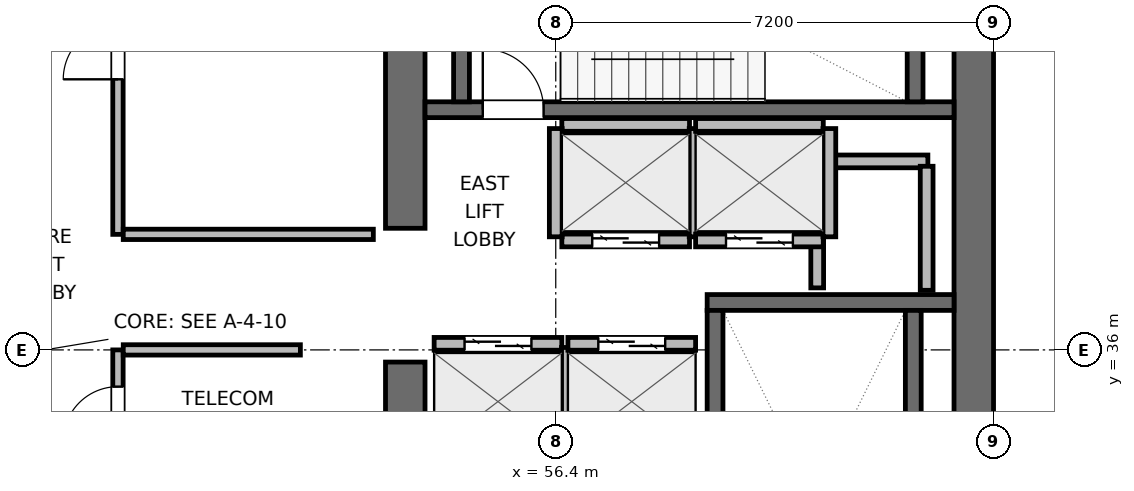
"""IFC4 building model, lengths in metres.
Left out: names, types, materials, properties, quantities, classifications, styles, units other than length and angle.
Written with IfcOpenShell. Run it as: python <this file> out.ifc"""

import sys

from ifc_helpers import new_model, si_unit, direction, frame, frame_2d, origin, place, context, subcontext, project, spatial, rectangle, extrude, element, fill, save


model = new_model("IFC4")
c1 = context("Model", 3, precision=1e-05, world=origin(), true_north=direction((0.0, 1.0)))
c2 = subcontext(c1, "Body", "Model", "MODEL_VIEW")
j1 = project(units=[si_unit("LENGTHUNIT", "METRE"), si_unit("PLANEANGLEUNIT", "RADIAN")], contexts=[c1])
p1 = place(None, origin())
s1 = spatial("IfcSite", under=j1, at=p1, CompositionType="ELEMENT")
p2 = place(p1, origin())
s2 = spatial("IfcBuilding", under=s1, at=p2, CompositionType="ELEMENT")
p3 = place(p2, frame((0.0, 0.0, 214.8)))
s3 = spatial("IfcBuildingStorey", under=s2, at=p3, CompositionType="ELEMENT", Elevation=214.8)
p4 = place(p3, frame((53.925, 27.925, 0.0), z_axis=(0.0, 0.0, 1.0), x_axis=(0.0, 1.0, 0.0)))
e1 = element("IfcWall", 1, at=p4, inside=s3, PredefinedType="SHEAR", context=c2, shape_type="SweptSolid", body=[
    extrude(rectangle(XDim=7.875, YDim=0.65, at=frame_2d((3.938, 0.0))), origin(), (0.0, 0.0, 1.0), 4.5),
])
p5 = place(p3, frame((53.925, 38.0, 0.0), z_axis=(0.0, 0.0, 1.0), x_axis=(0.0, 1.0, 0.0)))
e2 = element("IfcWall", 2, at=p5, inside=s3, PredefinedType="SHEAR", context=c2, shape_type="SweptSolid", body=[
    extrude(rectangle(XDim=6.075, YDim=0.65, at=frame_2d((3.038, 0.0))), origin(), (0.0, 0.0, 1.0), 4.5),
])
p6 = place(p3, frame((63.275, 27.6, 0.0), z_axis=(0.0, 0.0, 1.0), x_axis=(0.0, 1.0, 0.0)))
e3 = element("IfcWall", 3, at=p6, inside=s3, PredefinedType="SHEAR", context=c2, shape_type="SweptSolid", body=[
    extrude(rectangle(XDim=16.8, YDim=0.65, at=frame_2d((8.4, 0.0))), origin(), (0.0, 0.0, 1.0), 4.5),
])
p7 = place(p3, frame((58.89, 36.78, 0.0), z_axis=(0.0, 0.0, 1.0), x_axis=(1.0, 0.0, 0.0)))
e4 = element("IfcWall", 4, at=p7, inside=s3, PredefinedType="SHEAR", context=c2, shape_type="SweptSolid", body=[
    extrude(rectangle(XDim=4.06, YDim=0.26, at=frame_2d((2.03, 0.0))), origin(), (0.0, 0.0, 1.0), 4.5),
])
p8 = place(p3, frame((59.02, 29.05, 0.0), z_axis=(0.0, 0.0, 1.0), x_axis=(0.0, 1.0, 0.0)))
e5 = element("IfcWall", 5, at=p8, inside=s3, PredefinedType="SHEAR", context=c2, shape_type="SweptSolid", body=[
    extrude(rectangle(XDim=7.6, YDim=0.26, at=frame_2d((3.8, 0.0))), origin(), (0.0, 0.0, 1.0), 4.5),
])
p9 = place(p8, frame((0.3, 0.0, 0.0)))
e6 = element("IfcOpeningElement", 6, at=p9, cuts=e5, PredefinedType="OPENING", context=c2, shape_type="SweptSolid", body=[
    extrude(rectangle(XDim=1.0, YDim=2.04, at=frame_2d((0.5, 1.02))), frame((0.0, 0.14, 0.0), z_axis=(0.0, -1.0, 0.0), x_axis=(1.0, 0.0, 0.0)), (0.0, 0.0, 1.0), 0.28),
])
p10 = place(p3, frame((62.28, 29.05, 0.0), z_axis=(0.0, 0.0, 1.0), x_axis=(0.0, 1.0, 0.0)))
e7 = element("IfcWall", 7, at=p10, inside=s3, PredefinedType="SHEAR", context=c2, shape_type="SweptSolid", body=[
    extrude(rectangle(XDim=7.6, YDim=0.26, at=frame_2d((3.8, 0.0))), origin(), (0.0, 0.0, 1.0), 4.5),
])
p11 = place(p3, frame((54.25, 39.95, 0.0), z_axis=(0.0, 0.0, 1.0), x_axis=(1.0, 0.0, 0.0)))
e8 = element("IfcWall", 8, at=p11, inside=s3, PredefinedType="SHEAR", context=c2, shape_type="SweptSolid", body=[
    extrude(rectangle(XDim=8.7, YDim=0.26, at=frame_2d((4.35, 0.0))), origin(), (0.0, 0.0, 1.0), 4.5),
])
p12 = place(p11, frame((0.95, 0.0, 0.0)))
e9 = element("IfcOpeningElement", 9, at=p12, cuts=e8, PredefinedType="OPENING", context=c2, shape_type="SweptSolid", body=[
    extrude(rectangle(XDim=1.0, YDim=2.04, at=frame_2d((0.5, 1.02))), frame((0.0, 0.14, 0.0), z_axis=(0.0, -1.0, 0.0), x_axis=(1.0, 0.0, 0.0)), (0.0, 0.0, 1.0), 0.28),
])
for number, where, z_axis, x_axis in (
    (10, (54.85, 40.08, 0.0), (0.0, 0.0, 1.0), (0.0, 1.0, 0.0)),
    (11, (62.31, 40.08, 0.0), (0.0, 0.0, 1.0), (0.0, 1.0, 0.0)),
):
    element("IfcWall", number, at=place(p3, frame(where, z_axis=z_axis, x_axis=x_axis)), inside=s3, PredefinedType="SHEAR", context=c2, shape_type="SweptSolid", body=[
        extrude(rectangle(XDim=2.94, YDim=0.26, at=frame_2d((1.47, 0.0))), origin(), (0.0, 0.0, 1.0), 4.5),
    ])
p13 = place(p3, frame((60.72, 39.1, 0.0), z_axis=(0.0, 0.0, 1.0), x_axis=(1.0, 0.0, 0.0)))
e12 = element("IfcWall", 12, at=p13, inside=s3, PredefinedType="PARTITIONING", context=c2, shape_type="SweptSolid", body=[
    extrude(rectangle(XDim=1.8, YDim=0.21, at=frame_2d((0.9, 0.0))), origin(), (0.0, 0.0, 1.0), 4.28),
])
p14 = place(p3, frame((60.7, 37.02, 0.0), z_axis=(0.0, 0.0, 1.0), x_axis=(0.0, 1.0, 0.0)))
e13 = element("IfcWall", 13, at=p14, inside=s3, PredefinedType="PARTITIONING", context=c2, shape_type="SweptSolid", body=[
    extrude(rectangle(XDim=1.96, YDim=0.21, at=frame_2d((0.98, 0.0))), origin(), (0.0, 0.0, 1.0), 4.28),
])
p15 = place(p3, frame((62.5, 36.98, 0.0), z_axis=(0.0, 0.0, 1.0), x_axis=(0.0, 1.0, 0.0)))
e14 = element("IfcWall", 14, at=p15, inside=s3, PredefinedType="PARTITIONING", context=c2, shape_type="SweptSolid", body=[
    extrude(rectangle(XDim=2.04, YDim=0.21, at=frame_2d((1.02, 0.0))), origin(), (0.0, 0.0, 1.0), 4.28),
])
p16 = place(p3, frame((54.4, 36.1, 0.0), z_axis=(0.0, 0.0, 1.0), x_axis=(1.0, 0.0, 0.0)))
e15 = element("IfcWall", 15, at=p16, inside=s3, PredefinedType="PARTITIONING", context=c2, shape_type="SweptSolid", body=[
    extrude(rectangle(XDim=2.1, YDim=0.21, at=frame_2d((1.05, 0.0))), origin(), (0.0, 0.0, 1.0), 4.28),
])
p17 = place(p16, frame((0.5, 0.0, 0.0)))
e16 = element("IfcOpeningElement", 16, at=p17, cuts=e15, PredefinedType="OPENING", context=c2, shape_type="SweptSolid", body=[
    extrude(rectangle(XDim=1.1, YDim=2.04, at=frame_2d((0.55, 1.02))), frame((0.0, 0.115, 0.0), z_axis=(0.0, -1.0, 0.0), x_axis=(1.0, 0.0, 0.0)), (0.0, 0.0, 1.0), 0.23),
])
p18 = place(p3, frame((56.6, 34.26, 0.0), z_axis=(0.0, 0.0, 1.0), x_axis=(0.0, 1.0, 0.0)))
e17 = element("IfcWall", 17, at=p18, inside=s3, PredefinedType="PARTITIONING", context=c2, shape_type="SweptSolid", body=[
    extrude(rectangle(XDim=1.78, YDim=0.21, at=frame_2d((0.89, 0.0))), origin(), (0.0, 0.0, 1.0), 4.28),
])
p19 = place(p3, frame((56.6, 36.1, 0.0), z_axis=(0.0, 0.0, 1.0), x_axis=(1.0, 0.0, 0.0)))
e18 = element("IfcWall", 18, at=p19, inside=s3, PredefinedType="PARTITIONING", context=c2, shape_type="SweptSolid", body=[
    extrude(rectangle(XDim=2.1, YDim=0.21, at=frame_2d((1.05, 0.0))), origin(), (0.0, 0.0, 1.0), 4.28),
])
p20 = place(p19, frame((0.5, 0.0, 0.0)))
e19 = element("IfcOpeningElement", 19, at=p20, cuts=e18, PredefinedType="OPENING", context=c2, shape_type="SweptSolid", body=[
    extrude(rectangle(XDim=1.1, YDim=2.04, at=frame_2d((0.55, 1.02))), frame((0.0, 0.115, 0.0), z_axis=(0.0, -1.0, 0.0), x_axis=(1.0, 0.0, 0.0)), (0.0, 0.0, 1.0), 0.23),
])
p21 = place(p3, frame((56.5, 37.8, 0.0), z_axis=(0.0, 0.0, 1.0), x_axis=(1.0, 0.0, 0.0)))
e20 = element("IfcWall", 20, at=p21, inside=s3, PredefinedType="PARTITIONING", context=c2, shape_type="SweptSolid", body=[
    extrude(rectangle(XDim=2.1, YDim=0.21, at=frame_2d((1.05, 0.0))), origin(), (0.0, 0.0, 1.0), 4.28),
])
p22 = place(p21, frame((0.5, 0.0, 0.0)))
e21 = element("IfcOpeningElement", 21, at=p22, cuts=e20, PredefinedType="OPENING", context=c2, shape_type="SweptSolid", body=[
    extrude(rectangle(XDim=1.1, YDim=2.04, at=frame_2d((0.55, 1.02))), frame((0.0, 0.115, 0.0), z_axis=(0.0, -1.0, 0.0), x_axis=(1.0, 0.0, 0.0)), (0.0, 0.0, 1.0), 0.23),
])
p23 = place(p3, frame((56.5, 39.7, 0.0), z_axis=(0.0, 0.0, 1.0), x_axis=(1.0, 0.0, 0.0)))
e22 = element("IfcWall", 22, at=p23, inside=s3, PredefinedType="PARTITIONING", context=c2, shape_type="SweptSolid", body=[
    extrude(rectangle(XDim=2.1, YDim=0.21, at=frame_2d((1.05, 0.0))), origin(), (0.0, 0.0, 1.0), 4.28),
])
for number, where, z_axis, x_axis in (
    (23, (56.4, 37.86, 0.0), (0.0, 0.0, 1.0), (0.0, 1.0, 0.0)),
    (24, (58.7, 37.86, 0.0), (0.0, 0.0, 1.0), (0.0, 1.0, 0.0)),
):
    element("IfcWall", number, at=place(p3, frame(where, z_axis=z_axis, x_axis=x_axis)), inside=s3, PredefinedType="PARTITIONING", context=c2, shape_type="SweptSolid", body=[
        extrude(rectangle(XDim=1.78, YDim=0.21, at=frame_2d((0.89, 0.0))), origin(), (0.0, 0.0, 1.0), 4.28),
    ])
p24 = place(p3, frame((58.7, 37.8, 0.0), z_axis=(0.0, 0.0, 1.0), x_axis=(1.0, 0.0, 0.0)))
e25 = element("IfcWall", 25, at=p24, inside=s3, PredefinedType="PARTITIONING", context=c2, shape_type="SweptSolid", body=[
    extrude(rectangle(XDim=2.1, YDim=0.21, at=frame_2d((1.05, 0.0))), origin(), (0.0, 0.0, 1.0), 4.28),
])
p25 = place(p24, frame((0.5, 0.0, 0.0)))
e26 = element("IfcOpeningElement", 26, at=p25, cuts=e25, PredefinedType="OPENING", context=c2, shape_type="SweptSolid", body=[
    extrude(rectangle(XDim=1.1, YDim=2.04, at=frame_2d((0.55, 1.02))), frame((0.0, 0.115, 0.0), z_axis=(0.0, -1.0, 0.0), x_axis=(1.0, 0.0, 0.0)), (0.0, 0.0, 1.0), 0.23),
])
p26 = place(p3, frame((58.7, 39.7, 0.0), z_axis=(0.0, 0.0, 1.0), x_axis=(1.0, 0.0, 0.0)))
e27 = element("IfcWall", 27, at=p26, inside=s3, PredefinedType="PARTITIONING", context=c2, shape_type="SweptSolid", body=[
    extrude(rectangle(XDim=2.1, YDim=0.21, at=frame_2d((1.05, 0.0))), origin(), (0.0, 0.0, 1.0), 4.28),
])
p27 = place(p3, frame((60.9, 37.86, 0.0), z_axis=(0.0, 0.0, 1.0), x_axis=(0.0, 1.0, 0.0)))
e28 = element("IfcWall", 28, at=p27, inside=s3, PredefinedType="PARTITIONING", context=c2, shape_type="SweptSolid", body=[
    extrude(rectangle(XDim=1.78, YDim=0.21, at=frame_2d((0.89, 0.0))), origin(), (0.0, 0.0, 1.0), 4.28),
])
p28 = place(p3, frame((49.2, 32.6, 0.0), z_axis=(0.0, 0.0, 1.0), x_axis=(0.0, 1.0, 0.0)))
e29 = element("IfcWall", 29, at=p28, inside=s3, PredefinedType="PARTITIONING", context=c2, shape_type="SweptSolid", body=[
    extrude(rectangle(XDim=3.4, YDim=0.17, at=frame_2d((1.7, 0.0))), origin(), (0.0, 0.0, 1.0), 4.28),
])
p29 = place(p28, frame((0.196, 0.0, 0.0)))
e30 = element("IfcOpeningElement", 30, at=p29, cuts=e29, PredefinedType="OPENING", context=c2, shape_type="SweptSolid", body=[
    extrude(rectangle(XDim=0.9, YDim=2.02, at=frame_2d((0.45, 1.01))), frame((0.0, 0.095, 0.0), z_axis=(0.0, -1.0, 0.0), x_axis=(1.0, 0.0, 0.0)), (0.0, 0.0, 1.0), 0.19),
])
p30 = place(p28, frame((1.896, 0.0, 0.0)))
e31 = element("IfcOpeningElement", 31, at=p30, cuts=e29, PredefinedType="OPENING", context=c2, shape_type="SweptSolid", body=[
    extrude(rectangle(XDim=0.9, YDim=2.02, at=frame_2d((0.45, 1.01))), frame((0.0, 0.095, 0.0), z_axis=(0.0, -1.0, 0.0), x_axis=(1.0, 0.0, 0.0)), (0.0, 0.0, 1.0), 0.19),
])
p31 = place(p3, frame((49.287, 36.0, 0.0), z_axis=(0.0, 0.0, 1.0), x_axis=(1.0, 0.0, 0.0)))
e32 = element("IfcWall", 32, at=p31, inside=s3, PredefinedType="PARTITIONING", context=c2, shape_type="SweptSolid", body=[
    extrude(rectangle(XDim=2.913, YDim=0.17, at=frame_2d((1.457, 0.0))), origin(), (0.0, 0.0, 1.0), 4.28),
])
p32 = place(p3, frame((49.2, 37.9, 0.0), z_axis=(0.0, 0.0, 1.0), x_axis=(0.0, 1.0, 0.0)))
e33 = element("IfcWall", 33, at=p32, inside=s3, PredefinedType="PARTITIONING", context=c2, shape_type="SweptSolid", body=[
    extrude(rectangle(XDim=6.0, YDim=0.17, at=frame_2d((3.0, 0.0))), origin(), (0.0, 0.0, 1.0), 4.28),
])
p33 = place(p32, frame((2.55, 0.0, 0.0)))
e34 = element("IfcOpeningElement", 34, at=p33, cuts=e33, PredefinedType="OPENING", context=c2, shape_type="SweptSolid", body=[
    extrude(rectangle(XDim=0.9, YDim=2.02, at=frame_2d((0.45, 1.01))), frame((0.0, 0.095, 0.0), z_axis=(0.0, -1.0, 0.0), x_axis=(1.0, 0.0, 0.0)), (0.0, 0.0, 1.0), 0.19),
])
p34 = place(p3, frame((49.287, 37.9, 0.0), z_axis=(0.0, 0.0, 1.0), x_axis=(1.0, 0.0, 0.0)))
e35 = element("IfcWall", 35, at=p34, inside=s3, PredefinedType="PARTITIONING", context=c2, shape_type="SweptSolid", body=[
    extrude(rectangle(XDim=4.113, YDim=0.17, at=frame_2d((2.056, 0.0))), origin(), (0.0, 0.0, 1.0), 4.28),
])
p35 = place(p12, origin())
e36 = element("IfcDoor", 36, at=p35, inside=s3, OperationType="SINGLE_SWING_LEFT", PredefinedType="DOOR", context=c2, shape_type="SweptSolid", body=[
    extrude(rectangle(XDim=1.0, YDim=2.04, at=frame_2d((0.5, 1.02))), frame((0.0, 0.025, 0.0), z_axis=(0.0, -1.0, 0.0), x_axis=(1.0, 0.0, 0.0)), (0.0, 0.0, 1.0), 0.05),
])
fill(e9, e36)
p36 = place(p17, origin())
e37 = element("IfcDoor", 37, at=p36, inside=s3, OperationType="DOUBLE_DOOR_SLIDING", PredefinedType="DOOR", context=c2, shape_type="SweptSolid", body=[
    extrude(rectangle(XDim=1.1, YDim=2.04, at=frame_2d((0.55, 1.02))), frame((0.0, 0.025, 0.0), z_axis=(0.0, -1.0, 0.0), x_axis=(1.0, 0.0, 0.0)), (0.0, 0.0, 1.0), 0.05),
])
fill(e16, e37)
p37 = place(p20, origin())
e38 = element("IfcDoor", 38, at=p37, inside=s3, OperationType="DOUBLE_DOOR_SLIDING", PredefinedType="DOOR", context=c2, shape_type="SweptSolid", body=[
    extrude(rectangle(XDim=1.1, YDim=2.04, at=frame_2d((0.55, 1.02))), frame((0.0, 0.025, 0.0), z_axis=(0.0, -1.0, 0.0), x_axis=(1.0, 0.0, 0.0)), (0.0, 0.0, 1.0), 0.05),
])
fill(e19, e38)
p38 = place(p22, origin())
e39 = element("IfcDoor", 39, at=p38, inside=s3, OperationType="DOUBLE_DOOR_SLIDING", PredefinedType="DOOR", context=c2, shape_type="SweptSolid", body=[
    extrude(rectangle(XDim=1.1, YDim=2.04, at=frame_2d((0.55, 1.02))), frame((0.0, 0.025, 0.0), z_axis=(0.0, -1.0, 0.0), x_axis=(1.0, 0.0, 0.0)), (0.0, 0.0, 1.0), 0.05),
])
fill(e21, e39)
p39 = place(p25, origin())
e40 = element("IfcDoor", 40, at=p39, inside=s3, OperationType="DOUBLE_DOOR_SLIDING", PredefinedType="DOOR", context=c2, shape_type="SweptSolid", body=[
    extrude(rectangle(XDim=1.1, YDim=2.04, at=frame_2d((0.55, 1.02))), frame((0.0, 0.025, 0.0), z_axis=(0.0, -1.0, 0.0), x_axis=(1.0, 0.0, 0.0)), (0.0, 0.0, 1.0), 0.05),
])
fill(e26, e40)
p40 = place(p30, origin())
e41 = element("IfcDoor", 41, at=p40, inside=s3, OperationType="SINGLE_SWING_LEFT", PredefinedType="DOOR", context=c2, shape_type="SweptSolid", body=[
    extrude(rectangle(XDim=0.9, YDim=2.02, at=frame_2d((0.45, 1.01))), frame((0.0, 0.025, 0.0), z_axis=(0.0, -1.0, 0.0), x_axis=(1.0, 0.0, 0.0)), (0.0, 0.0, 1.0), 0.05),
])
fill(e31, e41)
p41 = place(p33, origin())
e42 = element("IfcDoor", 42, at=p41, inside=s3, OperationType="SINGLE_SWING_LEFT", PredefinedType="DOOR", context=c2, shape_type="SweptSolid", body=[
    extrude(rectangle(XDim=0.9, YDim=2.02, at=frame_2d((0.45, 1.01))), frame((0.0, 0.025, 0.0), z_axis=(0.0, -1.0, 0.0), x_axis=(1.0, 0.0, 0.0)), (0.0, 0.0, 1.0), 0.05),
])
fill(e34, e42)
save(model, sys.argv[1])
